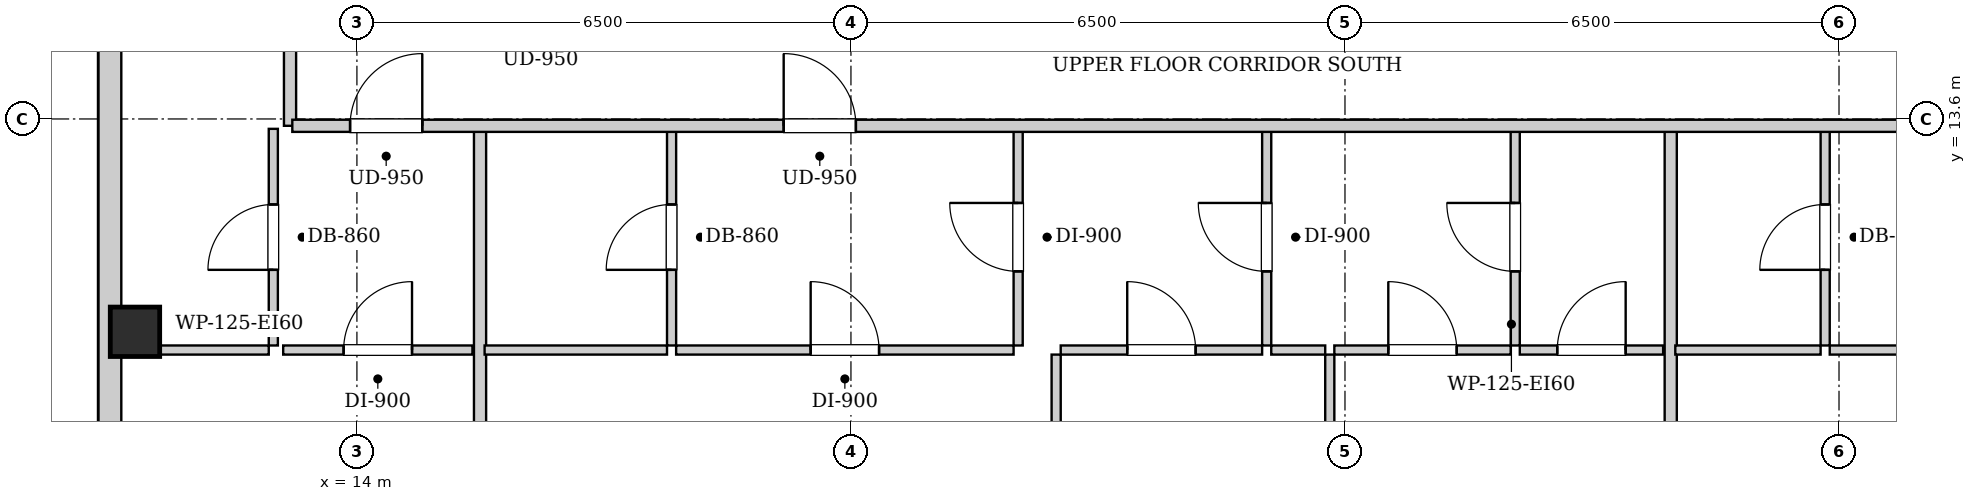
"""IFC4 building model, lengths in metres.
Left out: names, types, materials, properties, quantities, classifications, styles, units other than length and angle.
Written with IfcOpenShell. Run it as: python <this file> out.ifc"""

import sys

from ifc_helpers import new_model, si_unit, direction, frame, frame_2d, origin, origin_2d, place, context, subcontext, project, spatial, rectangle, extrude, element, fill, save


model = new_model("IFC4")
c1 = context("Model", 3, precision=1e-05, world=origin(), true_north=direction((0.0, 1.0)))
c2 = subcontext(c1, "Body", "Model", "MODEL_VIEW")
j1 = project(units=[si_unit("LENGTHUNIT", "METRE"), si_unit("PLANEANGLEUNIT", "RADIAN")], contexts=[c1])
p1 = place(None, origin())
s1 = spatial("IfcSite", under=j1, at=p1, CompositionType="ELEMENT")
p2 = place(p1, origin())
s2 = spatial("IfcBuilding", under=s1, at=p2, CompositionType="ELEMENT")
p3 = place(p2, frame((0.0, 0.0, 187.6)))
s3 = spatial("IfcBuildingStorey", under=s2, at=p3, CompositionType="ELEMENT", Elevation=187.6)
p4 = place(p3, frame((11.08, 10.8, 0.0), z_axis=(0.0, 0.0, 1.0), x_axis=(1.0, 0.0, 0.0)))
e1 = element("IfcColumn", 1, at=p4, inside=s3, PredefinedType="COLUMN", context=c2, shape_type="SweptSolid", body=[
    extrude(rectangle(XDim=0.65, YDim=0.65, at=origin_2d()), origin(), (0.0, 0.0, 1.0), 3.3),
])
p5 = place(p3, frame((10.75, 6.3, 0.0), z_axis=(0.0, 0.0, 1.0), x_axis=(0.0, 1.0, 0.0)))
e2 = element("IfcWall", 2, at=p5, inside=s3, PredefinedType="SOLIDWALL", context=c2, shape_type="SweptSolid", body=[
    extrude(rectangle(XDim=31.4, YDim=0.3, at=frame_2d((15.7, 0.0))), origin(), (0.0, 0.0, 1.0), 3.04),
])
p6 = place(p5, frame((1.504, 0.0, 0.55)))
e3 = element("IfcOpeningElement", 3, at=p6, cuts=e2, PredefinedType="OPENING", context=c2, shape_type="SweptSolid", body=[
    extrude(rectangle(XDim=1.35, YDim=1.2, at=frame_2d((0.675, 0.6))), frame((0.0, 0.16, 0.0), z_axis=(0.0, -1.0, 0.0), x_axis=(1.0, 0.0, 0.0)), (0.0, 0.0, 1.0), 0.32),
])
p7 = place(p5, frame((28.546, 0.0, 0.55)))
e4 = element("IfcOpeningElement", 4, at=p7, cuts=e2, PredefinedType="OPENING", context=c2, shape_type="SweptSolid", body=[
    extrude(rectangle(XDim=1.35, YDim=1.2, at=frame_2d((0.675, 0.6))), frame((0.0, 0.16, 0.0), z_axis=(0.0, -1.0, 0.0), x_axis=(1.0, 0.0, 0.0)), (0.0, 0.0, 1.0), 0.32),
])
p8 = place(p5, frame((11.85, 0.0, 0.55)))
e5 = element("IfcOpeningElement", 5, at=p8, cuts=e2, PredefinedType="OPENING", context=c2, shape_type="SweptSolid", body=[
    extrude(rectangle(XDim=1.35, YDim=1.2, at=frame_2d((0.675, 0.6))), frame((0.0, 0.16, 0.0), z_axis=(0.0, -1.0, 0.0), x_axis=(1.0, 0.0, 0.0)), (0.0, 0.0, 1.0), 0.32),
])
p9 = place(p5, frame((9.185, 0.0, 0.55)))
e6 = element("IfcOpeningElement", 6, at=p9, cuts=e2, PredefinedType="OPENING", context=c2, shape_type="SweptSolid", body=[
    extrude(rectangle(XDim=1.35, YDim=1.2, at=frame_2d((0.675, 0.6))), frame((0.0, 0.16, 0.0), z_axis=(0.0, -1.0, 0.0), x_axis=(1.0, 0.0, 0.0)), (0.0, 0.0, 1.0), 0.32),
])
p10 = place(p5, frame((19.006, 0.0, 0.55)))
e7 = element("IfcOpeningElement", 7, at=p10, cuts=e2, PredefinedType="OPENING", context=c2, shape_type="SweptSolid", body=[
    extrude(rectangle(XDim=1.35, YDim=1.2, at=frame_2d((0.675, 0.6))), frame((0.0, 0.16, 0.0), z_axis=(0.0, -1.0, 0.0), x_axis=(1.0, 0.0, 0.0)), (0.0, 0.0, 1.0), 0.32),
])
p11 = place(p5, frame((20.616, 0.0, 0.55)))
e8 = element("IfcOpeningElement", 8, at=p11, cuts=e2, PredefinedType="OPENING", context=c2, shape_type="SweptSolid", body=[
    extrude(rectangle(XDim=1.35, YDim=1.2, at=frame_2d((0.675, 0.6))), frame((0.0, 0.16, 0.0), z_axis=(0.0, -1.0, 0.0), x_axis=(1.0, 0.0, 0.0)), (0.0, 0.0, 1.0), 0.32),
])
p12 = place(p3, frame((13.12, 13.51, 0.0), z_axis=(0.0, 0.0, 1.0), x_axis=(0.0, 1.0, 0.0)))
e9 = element("IfcWall", 9, at=p12, inside=s3, PredefinedType="PARTITIONING", context=c2, shape_type="SweptSolid", body=[
    extrude(rectangle(XDim=1.58, YDim=0.16, at=frame_2d((0.79, 0.0))), origin(), (0.0, 0.0, 1.0), 3.04),
])
p13 = place(p3, frame((12.9, 10.62, 0.0), z_axis=(0.0, 0.0, 1.0), x_axis=(0.0, 1.0, 0.0)))
e10 = element("IfcWall", 10, at=p13, inside=s3, PredefinedType="PARTITIONING", context=c2, shape_type="SweptSolid", body=[
    extrude(rectangle(XDim=2.85, YDim=0.12, at=frame_2d((1.425, 0.0))), origin(), (0.0, 0.0, 1.0), 3.04),
])
p14 = place(p13, frame((0.995, 0.0, 0.0)))
e11 = element("IfcOpeningElement", 11, at=p14, cuts=e10, PredefinedType="OPENING", context=c2, shape_type="SweptSolid", body=[
    extrude(rectangle(XDim=0.86, YDim=2.05, at=frame_2d((0.43, 1.025))), frame((0.0, 0.07, 0.0), z_axis=(0.0, -1.0, 0.0), x_axis=(1.0, 0.0, 0.0)), (0.0, 0.0, 1.0), 0.14),
])
p15 = place(p3, frame((10.99, 10.56, 0.0), z_axis=(0.0, 0.0, 1.0), x_axis=(1.0, 0.0, 0.0)))
e12 = element("IfcWall", 12, at=p15, inside=s3, PredefinedType="PARTITIONING", context=c2, shape_type="SweptSolid", body=[
    extrude(rectangle(XDim=1.85, YDim=0.12, at=frame_2d((0.925, 0.0))), origin(), (0.0, 0.0, 1.0), 3.04),
])
p16 = place(p3, frame((13.03, 10.56, 0.0), z_axis=(0.0, 0.0, 1.0), x_axis=(1.0, 0.0, 0.0)))
e13 = element("IfcWall", 13, at=p16, inside=s3, PredefinedType="PARTITIONING", context=c2, shape_type="SweptSolid", body=[
    extrude(rectangle(XDim=2.49, YDim=0.12, at=frame_2d((1.245, 0.0))), origin(), (0.0, 0.0, 1.0), 3.04),
])
p17 = place(p16, frame((0.795, 0.0, 0.0)))
e14 = element("IfcOpeningElement", 14, at=p17, cuts=e13, PredefinedType="OPENING", context=c2, shape_type="SweptSolid", body=[
    extrude(rectangle(XDim=0.9, YDim=2.05, at=frame_2d((0.45, 1.025))), frame((0.0, 0.07, 0.0), z_axis=(0.0, -1.0, 0.0), x_axis=(1.0, 0.0, 0.0)), (0.0, 0.0, 1.0), 0.14),
])
p18 = place(p3, frame((15.62, 4.08, 0.0), z_axis=(0.0, 0.0, 1.0), x_axis=(0.0, 1.0, 0.0)))
e15 = element("IfcWall", 15, at=p18, inside=s3, PredefinedType="PARTITIONING", context=c2, shape_type="SweptSolid", body=[
    extrude(rectangle(XDim=9.39, YDim=0.16, at=frame_2d((4.695, 0.0))), origin(), (0.0, 0.0, 1.0), 3.04),
])
p19 = place(p3, frame((18.14, 10.62, 0.0), z_axis=(0.0, 0.0, 1.0), x_axis=(0.0, 1.0, 0.0)))
e16 = element("IfcWall", 16, at=p19, inside=s3, PredefinedType="PARTITIONING", context=c2, shape_type="SweptSolid", body=[
    extrude(rectangle(XDim=2.85, YDim=0.12, at=frame_2d((1.425, 0.0))), origin(), (0.0, 0.0, 1.0), 3.04),
])
p20 = place(p19, frame((0.995, 0.0, 0.0)))
e17 = element("IfcOpeningElement", 17, at=p20, cuts=e16, PredefinedType="OPENING", context=c2, shape_type="SweptSolid", body=[
    extrude(rectangle(XDim=0.86, YDim=2.05, at=frame_2d((0.43, 1.025))), frame((0.0, 0.07, 0.0), z_axis=(0.0, -1.0, 0.0), x_axis=(1.0, 0.0, 0.0)), (0.0, 0.0, 1.0), 0.14),
])
p21 = place(p3, frame((15.68, 10.56, 0.0), z_axis=(0.0, 0.0, 1.0), x_axis=(1.0, 0.0, 0.0)))
e18 = element("IfcWall", 18, at=p21, inside=s3, PredefinedType="PARTITIONING", context=c2, shape_type="SweptSolid", body=[
    extrude(rectangle(XDim=2.4, YDim=0.12, at=frame_2d((1.2, 0.0))), origin(), (0.0, 0.0, 1.0), 3.04),
])
p22 = place(p3, frame((22.7, 10.62, 0.0), z_axis=(0.0, 0.0, 1.0), x_axis=(0.0, 1.0, 0.0)))
e19 = element("IfcWall", 19, at=p22, inside=s3, PredefinedType="PARTITIONING", context=c2, shape_type="SweptSolid", body=[
    extrude(rectangle(XDim=2.85, YDim=0.12, at=frame_2d((1.425, 0.0))), origin(), (0.0, 0.0, 1.0), 3.04),
])
p23 = place(p22, frame((0.975, 0.0, 0.0)))
e20 = element("IfcOpeningElement", 20, at=p23, cuts=e19, PredefinedType="OPENING", context=c2, shape_type="SweptSolid", body=[
    extrude(rectangle(XDim=0.9, YDim=2.05, at=frame_2d((0.45, 1.025))), frame((0.0, 0.07, 0.0), z_axis=(0.0, -1.0, 0.0), x_axis=(1.0, 0.0, 0.0)), (0.0, 0.0, 1.0), 0.14),
])
p24 = place(p3, frame((18.2, 10.56, 0.0), z_axis=(0.0, 0.0, 1.0), x_axis=(1.0, 0.0, 0.0)))
e21 = element("IfcWall", 21, at=p24, inside=s3, PredefinedType="PARTITIONING", context=c2, shape_type="SweptSolid", body=[
    extrude(rectangle(XDim=4.44, YDim=0.12, at=frame_2d((2.22, 0.0))), origin(), (0.0, 0.0, 1.0), 3.04),
])
p25 = place(p24, frame((1.77, 0.0, 0.0)))
e22 = element("IfcOpeningElement", 22, at=p25, cuts=e21, PredefinedType="OPENING", context=c2, shape_type="SweptSolid", body=[
    extrude(rectangle(XDim=0.9, YDim=2.05, at=frame_2d((0.45, 1.025))), frame((0.0, 0.07, 0.0), z_axis=(0.0, -1.0, 0.0), x_axis=(1.0, 0.0, 0.0)), (0.0, 0.0, 1.0), 0.14),
])
p26 = place(p3, frame((25.97, 10.62, 0.0), z_axis=(0.0, 0.0, 1.0), x_axis=(0.0, 1.0, 0.0)))
e23 = element("IfcWall", 23, at=p26, inside=s3, PredefinedType="PARTITIONING", context=c2, shape_type="SweptSolid", body=[
    extrude(rectangle(XDim=2.85, YDim=0.12, at=frame_2d((1.425, 0.0))), origin(), (0.0, 0.0, 1.0), 3.04),
])
p27 = place(p26, frame((0.975, 0.0, 0.0)))
e24 = element("IfcOpeningElement", 24, at=p27, cuts=e23, PredefinedType="OPENING", context=c2, shape_type="SweptSolid", body=[
    extrude(rectangle(XDim=0.9, YDim=2.05, at=frame_2d((0.45, 1.025))), frame((0.0, 0.07, 0.0), z_axis=(0.0, -1.0, 0.0), x_axis=(1.0, 0.0, 0.0)), (0.0, 0.0, 1.0), 0.14),
])
p28 = place(p3, frame((23.26, 10.56, 0.0), z_axis=(0.0, 0.0, 1.0), x_axis=(1.0, 0.0, 0.0)))
e25 = element("IfcWall", 25, at=p28, inside=s3, PredefinedType="PARTITIONING", context=c2, shape_type="SweptSolid", body=[
    extrude(rectangle(XDim=2.65, YDim=0.12, at=frame_2d((1.325, 0.0))), origin(), (0.0, 0.0, 1.0), 3.04),
])
p29 = place(p28, frame((0.875, 0.0, 0.0)))
e26 = element("IfcOpeningElement", 26, at=p29, cuts=e25, PredefinedType="OPENING", context=c2, shape_type="SweptSolid", body=[
    extrude(rectangle(XDim=0.9, YDim=2.05, at=frame_2d((0.45, 1.025))), frame((0.0, 0.07, 0.0), z_axis=(0.0, -1.0, 0.0), x_axis=(1.0, 0.0, 0.0)), (0.0, 0.0, 1.0), 0.14),
])
p30 = place(p3, frame((29.24, 10.62, 0.0), z_axis=(0.0, 0.0, 1.0), x_axis=(0.0, 1.0, 0.0)))
e27 = element("IfcWall", 27, at=p30, inside=s3, PredefinedType="PARTITIONING", context=c2, shape_type="SweptSolid", body=[
    extrude(rectangle(XDim=2.85, YDim=0.12, at=frame_2d((1.425, 0.0))), origin(), (0.0, 0.0, 1.0), 3.04),
])
p31 = place(p30, frame((0.975, 0.0, 0.0)))
e28 = element("IfcOpeningElement", 28, at=p31, cuts=e27, PredefinedType="OPENING", context=c2, shape_type="SweptSolid", body=[
    extrude(rectangle(XDim=0.9, YDim=2.05, at=frame_2d((0.45, 1.025))), frame((0.0, 0.07, 0.0), z_axis=(0.0, -1.0, 0.0), x_axis=(1.0, 0.0, 0.0)), (0.0, 0.0, 1.0), 0.14),
])
p32 = place(p3, frame((26.03, 10.56, 0.0), z_axis=(0.0, 0.0, 1.0), x_axis=(1.0, 0.0, 0.0)))
e29 = element("IfcWall", 29, at=p32, inside=s3, PredefinedType="PARTITIONING", context=c2, shape_type="SweptSolid", body=[
    extrude(rectangle(XDim=0.71, YDim=0.12, at=frame_2d((0.355, 0.0))), origin(), (0.0, 0.0, 1.0), 3.04),
])
p33 = place(p3, frame((26.86, 10.56, 0.0), z_axis=(0.0, 0.0, 1.0), x_axis=(1.0, 0.0, 0.0)))
e30 = element("IfcWall", 30, at=p33, inside=s3, PredefinedType="PARTITIONING", context=c2, shape_type="SweptSolid", body=[
    extrude(rectangle(XDim=2.32, YDim=0.12, at=frame_2d((1.16, 0.0))), origin(), (0.0, 0.0, 1.0), 3.04),
])
p34 = place(p33, frame((0.71, 0.0, 0.0)))
e31 = element("IfcOpeningElement", 31, at=p34, cuts=e30, PredefinedType="OPENING", context=c2, shape_type="SweptSolid", body=[
    extrude(rectangle(XDim=0.9, YDim=2.05, at=frame_2d((0.45, 1.025))), frame((0.0, 0.07, 0.0), z_axis=(0.0, -1.0, 0.0), x_axis=(1.0, 0.0, 0.0)), (0.0, 0.0, 1.0), 0.14),
])
p35 = place(p3, frame((29.3, 10.56, 0.0), z_axis=(0.0, 0.0, 1.0), x_axis=(1.0, 0.0, 0.0)))
e32 = element("IfcWall", 32, at=p35, inside=s3, PredefinedType="PARTITIONING", context=c2, shape_type="SweptSolid", body=[
    extrude(rectangle(XDim=1.886, YDim=0.12, at=frame_2d((0.943, 0.0))), origin(), (0.0, 0.0, 1.0), 3.04),
])
p36 = place(p35, frame((0.493, 0.0, 0.0)))
e33 = element("IfcOpeningElement", 33, at=p36, cuts=e32, PredefinedType="OPENING", context=c2, shape_type="SweptSolid", body=[
    extrude(rectangle(XDim=0.9, YDim=2.05, at=frame_2d((0.45, 1.025))), frame((0.0, 0.07, 0.0), z_axis=(0.0, -1.0, 0.0), x_axis=(1.0, 0.0, 0.0)), (0.0, 0.0, 1.0), 0.14),
])
p37 = place(p3, frame((23.2, 4.08, 0.0), z_axis=(0.0, 0.0, 1.0), x_axis=(0.0, 1.0, 0.0)))
e34 = element("IfcWall", 34, at=p37, inside=s3, PredefinedType="PARTITIONING", context=c2, shape_type="SweptSolid", body=[
    extrude(rectangle(XDim=6.42, YDim=0.12, at=frame_2d((3.21, 0.0))), origin(), (0.0, 0.0, 1.0), 3.04),
])
p38 = place(p37, frame((2.745, 0.0, 0.0)))
e35 = element("IfcOpeningElement", 35, at=p38, cuts=e34, PredefinedType="OPENING", context=c2, shape_type="SweptSolid", body=[
    extrude(rectangle(XDim=0.9, YDim=2.05, at=frame_2d((0.45, 1.025))), frame((0.0, 0.07, 0.0), z_axis=(0.0, -1.0, 0.0), x_axis=(1.0, 0.0, 0.0)), (0.0, 0.0, 1.0), 0.14),
])
p39 = place(p3, frame((26.8, 4.08, 0.0), z_axis=(0.0, 0.0, 1.0), x_axis=(0.0, 1.0, 0.0)))
e36 = element("IfcWall", 36, at=p39, inside=s3, PredefinedType="PARTITIONING", context=c2, shape_type="SweptSolid", body=[
    extrude(rectangle(XDim=6.42, YDim=0.12, at=frame_2d((3.21, 0.0))), origin(), (0.0, 0.0, 1.0), 3.04),
])
p40 = place(p39, frame((2.745, 0.0, 0.0)))
e37 = element("IfcOpeningElement", 37, at=p40, cuts=e36, PredefinedType="OPENING", context=c2, shape_type="SweptSolid", body=[
    extrude(rectangle(XDim=0.9, YDim=2.05, at=frame_2d((0.45, 1.025))), frame((0.0, 0.07, 0.0), z_axis=(0.0, -1.0, 0.0), x_axis=(1.0, 0.0, 0.0)), (0.0, 0.0, 1.0), 0.14),
])
p41 = place(p3, frame((31.286, 4.08, 0.0), z_axis=(0.0, 0.0, 1.0), x_axis=(0.0, 1.0, 0.0)))
e38 = element("IfcWall", 38, at=p41, inside=s3, PredefinedType="PARTITIONING", context=c2, shape_type="SweptSolid", body=[
    extrude(rectangle(XDim=9.39, YDim=0.16, at=frame_2d((4.695, 0.0))), origin(), (0.0, 0.0, 1.0), 3.04),
])
p42 = place(p3, frame((33.318, 10.62, 0.0), z_axis=(0.0, 0.0, 1.0), x_axis=(0.0, 1.0, 0.0)))
e39 = element("IfcWall", 39, at=p42, inside=s3, PredefinedType="PARTITIONING", context=c2, shape_type="SweptSolid", body=[
    extrude(rectangle(XDim=2.85, YDim=0.12, at=frame_2d((1.425, 0.0))), origin(), (0.0, 0.0, 1.0), 3.04),
])
p43 = place(p42, frame((0.995, 0.0, 0.0)))
e40 = element("IfcOpeningElement", 40, at=p43, cuts=e39, PredefinedType="OPENING", context=c2, shape_type="SweptSolid", body=[
    extrude(rectangle(XDim=0.86, YDim=2.05, at=frame_2d((0.43, 1.025))), frame((0.0, 0.07, 0.0), z_axis=(0.0, -1.0, 0.0), x_axis=(1.0, 0.0, 0.0)), (0.0, 0.0, 1.0), 0.14),
])
p44 = place(p3, frame((31.346, 10.56, 0.0), z_axis=(0.0, 0.0, 1.0), x_axis=(1.0, 0.0, 0.0)))
e41 = element("IfcWall", 41, at=p44, inside=s3, PredefinedType="PARTITIONING", context=c2, shape_type="SweptSolid", body=[
    extrude(rectangle(XDim=1.912, YDim=0.12, at=frame_2d((0.956, 0.0))), origin(), (0.0, 0.0, 1.0), 3.04),
])
p45 = place(p3, frame((33.378, 10.56, 0.0), z_axis=(0.0, 0.0, 1.0), x_axis=(1.0, 0.0, 0.0)))
e42 = element("IfcWall", 42, at=p45, inside=s3, PredefinedType="PARTITIONING", context=c2, shape_type="SweptSolid", body=[
    extrude(rectangle(XDim=4.342, YDim=0.12, at=frame_2d((2.171, 0.0))), origin(), (0.0, 0.0, 1.0), 3.04),
])
p46 = place(p45, frame((1.721, 0.0, 0.0)))
e43 = element("IfcOpeningElement", 43, at=p46, cuts=e42, PredefinedType="OPENING", context=c2, shape_type="SweptSolid", body=[
    extrude(rectangle(XDim=0.9, YDim=2.05, at=frame_2d((0.45, 1.025))), frame((0.0, 0.07, 0.0), z_axis=(0.0, -1.0, 0.0), x_axis=(1.0, 0.0, 0.0)), (0.0, 0.0, 1.0), 0.14),
])
p47 = place(p3, frame((13.15, 13.51, 0.0), z_axis=(0.0, 0.0, 1.0), x_axis=(1.0, 0.0, 0.0)))
e44 = element("IfcWall", 44, at=p47, inside=s3, PredefinedType="PARTITIONING", context=c2, shape_type="SweptSolid", body=[
    extrude(rectangle(XDim=24.6, YDim=0.16, at=frame_2d((12.3, 0.0))), origin(), (0.0, 0.0, 1.0), 3.04),
])
p48 = place(p47, frame((0.76, 0.0, 0.0)))
e45 = element("IfcOpeningElement", 45, at=p48, cuts=e44, PredefinedType="OPENING", context=c2, shape_type="SweptSolid", body=[
    extrude(rectangle(XDim=0.95, YDim=2.1, at=frame_2d((0.475, 1.05))), frame((0.0, 0.09, 0.0), z_axis=(0.0, -1.0, 0.0), x_axis=(1.0, 0.0, 0.0)), (0.0, 0.0, 1.0), 0.18),
])
p49 = place(p47, frame((6.465, 0.0, 0.0)))
e46 = element("IfcOpeningElement", 46, at=p49, cuts=e44, PredefinedType="OPENING", context=c2, shape_type="SweptSolid", body=[
    extrude(rectangle(XDim=0.95, YDim=2.1, at=frame_2d((0.475, 1.05))), frame((0.0, 0.09, 0.0), z_axis=(0.0, -1.0, 0.0), x_axis=(1.0, 0.0, 0.0)), (0.0, 0.0, 1.0), 0.18),
])
p50 = place(p47, frame((21.889, 0.0, 0.0)))
e47 = element("IfcOpeningElement", 47, at=p50, cuts=e44, PredefinedType="OPENING", context=c2, shape_type="SweptSolid", body=[
    extrude(rectangle(XDim=0.95, YDim=2.1, at=frame_2d((0.475, 1.05))), frame((0.0, 0.09, 0.0), z_axis=(0.0, -1.0, 0.0), x_axis=(1.0, 0.0, 0.0)), (0.0, 0.0, 1.0), 0.18),
])
p51 = place(p14, origin())
e48 = element("IfcDoor", 48, at=p51, inside=s3, OperationType="SINGLE_SWING_LEFT", PredefinedType="DOOR", context=c2, shape_type="SweptSolid", body=[
    extrude(rectangle(XDim=0.86, YDim=2.05, at=frame_2d((0.43, 1.025))), frame((0.0, 0.025, 0.0), z_axis=(0.0, -1.0, 0.0), x_axis=(1.0, 0.0, 0.0)), (0.0, 0.0, 1.0), 0.05),
])
fill(e11, e48)
p52 = place(p17, origin())
e49 = element("IfcDoor", 49, at=p52, inside=s3, OperationType="SINGLE_SWING_RIGHT", PredefinedType="DOOR", context=c2, shape_type="SweptSolid", body=[
    extrude(rectangle(XDim=0.9, YDim=2.05, at=frame_2d((0.45, 1.025))), frame((0.0, 0.025, 0.0), z_axis=(0.0, -1.0, 0.0), x_axis=(1.0, 0.0, 0.0)), (0.0, 0.0, 1.0), 0.05),
])
fill(e14, e49)
p53 = place(p20, origin())
e50 = element("IfcDoor", 50, at=p53, inside=s3, OperationType="SINGLE_SWING_LEFT", PredefinedType="DOOR", context=c2, shape_type="SweptSolid", body=[
    extrude(rectangle(XDim=0.86, YDim=2.05, at=frame_2d((0.43, 1.025))), frame((0.0, 0.025, 0.0), z_axis=(0.0, -1.0, 0.0), x_axis=(1.0, 0.0, 0.0)), (0.0, 0.0, 1.0), 0.05),
])
fill(e17, e50)
p54 = place(p23, origin())
e51 = element("IfcDoor", 51, at=p54, inside=s3, OperationType="SINGLE_SWING_RIGHT", PredefinedType="DOOR", context=c2, shape_type="SweptSolid", body=[
    extrude(rectangle(XDim=0.9, YDim=2.05, at=frame_2d((0.45, 1.025))), frame((0.0, 0.025, 0.0), z_axis=(0.0, -1.0, 0.0), x_axis=(1.0, 0.0, 0.0)), (0.0, 0.0, 1.0), 0.05),
])
fill(e20, e51)
p55 = place(p25, origin())
e52 = element("IfcDoor", 52, at=p55, inside=s3, OperationType="SINGLE_SWING_LEFT", PredefinedType="DOOR", context=c2, shape_type="SweptSolid", body=[
    extrude(rectangle(XDim=0.9, YDim=2.05, at=frame_2d((0.45, 1.025))), frame((0.0, 0.025, 0.0), z_axis=(0.0, -1.0, 0.0), x_axis=(1.0, 0.0, 0.0)), (0.0, 0.0, 1.0), 0.05),
])
fill(e22, e52)
p56 = place(p27, origin())
e53 = element("IfcDoor", 53, at=p56, inside=s3, OperationType="SINGLE_SWING_RIGHT", PredefinedType="DOOR", context=c2, shape_type="SweptSolid", body=[
    extrude(rectangle(XDim=0.9, YDim=2.05, at=frame_2d((0.45, 1.025))), frame((0.0, 0.025, 0.0), z_axis=(0.0, -1.0, 0.0), x_axis=(1.0, 0.0, 0.0)), (0.0, 0.0, 1.0), 0.05),
])
fill(e24, e53)
p57 = place(p29, origin())
e54 = element("IfcDoor", 54, at=p57, inside=s3, OperationType="SINGLE_SWING_LEFT", PredefinedType="DOOR", context=c2, shape_type="SweptSolid", body=[
    extrude(rectangle(XDim=0.9, YDim=2.05, at=frame_2d((0.45, 1.025))), frame((0.0, 0.025, 0.0), z_axis=(0.0, -1.0, 0.0), x_axis=(1.0, 0.0, 0.0)), (0.0, 0.0, 1.0), 0.05),
])
fill(e26, e54)
p58 = place(p31, origin())
e55 = element("IfcDoor", 55, at=p58, inside=s3, OperationType="SINGLE_SWING_RIGHT", PredefinedType="DOOR", context=c2, shape_type="SweptSolid", body=[
    extrude(rectangle(XDim=0.9, YDim=2.05, at=frame_2d((0.45, 1.025))), frame((0.0, 0.025, 0.0), z_axis=(0.0, -1.0, 0.0), x_axis=(1.0, 0.0, 0.0)), (0.0, 0.0, 1.0), 0.05),
])
fill(e28, e55)
p59 = place(p34, origin())
e56 = element("IfcDoor", 56, at=p59, inside=s3, OperationType="SINGLE_SWING_LEFT", PredefinedType="DOOR", context=c2, shape_type="SweptSolid", body=[
    extrude(rectangle(XDim=0.9, YDim=2.05, at=frame_2d((0.45, 1.025))), frame((0.0, 0.025, 0.0), z_axis=(0.0, -1.0, 0.0), x_axis=(1.0, 0.0, 0.0)), (0.0, 0.0, 1.0), 0.05),
])
fill(e31, e56)
p60 = place(p36, origin())
e57 = element("IfcDoor", 57, at=p60, inside=s3, OperationType="SINGLE_SWING_RIGHT", PredefinedType="DOOR", context=c2, shape_type="SweptSolid", body=[
    extrude(rectangle(XDim=0.9, YDim=2.05, at=frame_2d((0.45, 1.025))), frame((0.0, 0.025, 0.0), z_axis=(0.0, -1.0, 0.0), x_axis=(1.0, 0.0, 0.0)), (0.0, 0.0, 1.0), 0.05),
])
fill(e33, e57)
p61 = place(p43, origin())
e58 = element("IfcDoor", 58, at=p61, inside=s3, OperationType="SINGLE_SWING_LEFT", PredefinedType="DOOR", context=c2, shape_type="SweptSolid", body=[
    extrude(rectangle(XDim=0.86, YDim=2.05, at=frame_2d((0.43, 1.025))), frame((0.0, 0.025, 0.0), z_axis=(0.0, -1.0, 0.0), x_axis=(1.0, 0.0, 0.0)), (0.0, 0.0, 1.0), 0.05),
])
fill(e40, e58)
p62 = place(p48, origin())
e59 = element("IfcDoor", 59, at=p62, inside=s3, OperationType="SINGLE_SWING_RIGHT", PredefinedType="DOOR", context=c2, shape_type="SweptSolid", body=[
    extrude(rectangle(XDim=0.95, YDim=2.1, at=frame_2d((0.475, 1.05))), frame((0.0, 0.025, 0.0), z_axis=(0.0, -1.0, 0.0), x_axis=(1.0, 0.0, 0.0)), (0.0, 0.0, 1.0), 0.05),
])
fill(e45, e59)
p63 = place(p49, origin())
e60 = element("IfcDoor", 60, at=p63, inside=s3, OperationType="SINGLE_SWING_LEFT", PredefinedType="DOOR", context=c2, shape_type="SweptSolid", body=[
    extrude(rectangle(XDim=0.95, YDim=2.1, at=frame_2d((0.475, 1.05))), frame((0.0, 0.025, 0.0), z_axis=(0.0, -1.0, 0.0), x_axis=(1.0, 0.0, 0.0)), (0.0, 0.0, 1.0), 0.05),
])
fill(e46, e60)
save(model, sys.argv[1])
